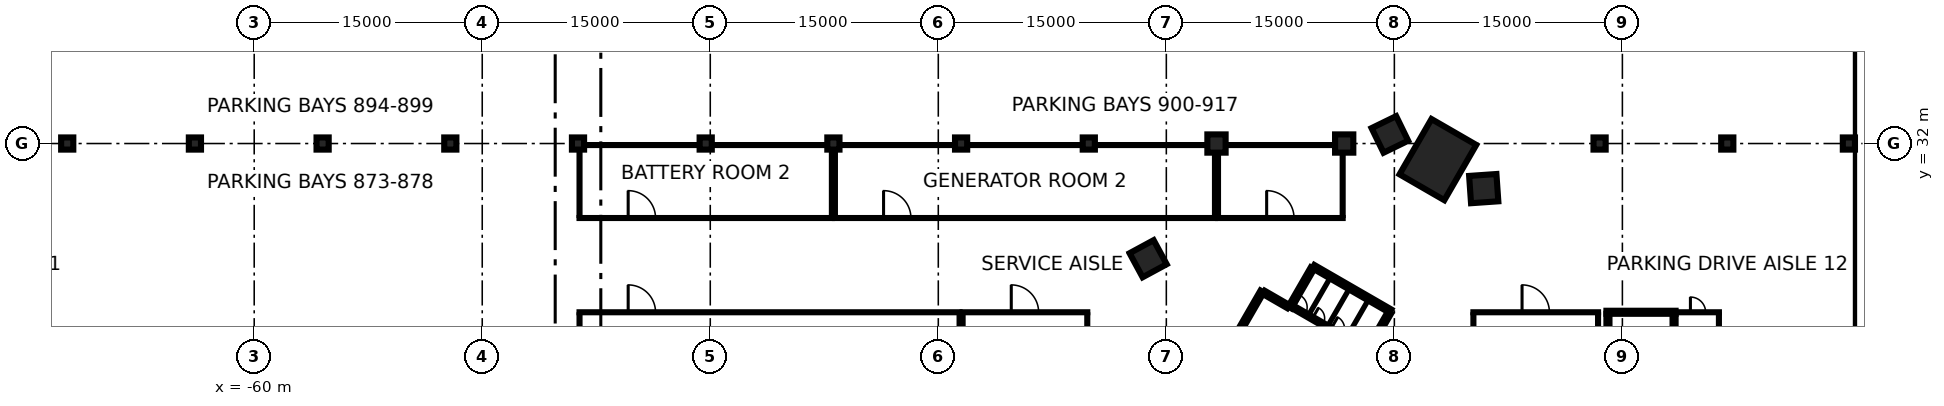
"""IFC4 building model, lengths in metres.
Left out: names, types, materials, properties, quantities, classifications, styles, units other than length and angle.
Written with IfcOpenShell. Run it as: python <this file> out.ifc"""

import sys

from ifc_helpers import new_model, si_unit, direction, frame, frame_2d, origin, origin_2d, place, context, subcontext, project, spatial, rectangle, extrude, element, fill, save


model = new_model("IFC4")
c1 = context("Model", 3, precision=1e-05, world=origin(), true_north=direction((0.0, 1.0)))
c2 = subcontext(c1, "Body", "Model", "MODEL_VIEW")
j1 = project(units=[si_unit("LENGTHUNIT", "METRE"), si_unit("PLANEANGLEUNIT", "RADIAN")], contexts=[c1])
p1 = place(None, origin())
s1 = spatial("IfcSite", under=j1, at=p1, CompositionType="ELEMENT")
p2 = place(p1, origin())
s2 = spatial("IfcBuilding", under=s1, at=p2, CompositionType="ELEMENT")
p3 = place(p2, frame((0.0, 0.0, -12.0)))
s3 = spatial("IfcBuildingStorey", under=s2, at=p3, CompositionType="ELEMENT", Elevation=-12.0)
p4 = place(p3, frame((45.75, -80.0, 0.0), z_axis=(0.0, 0.0, 1.0), x_axis=(0.0, 1.0, 0.0)))
e1 = element("IfcWall", 1, at=p4, inside=s3, PredefinedType="USERDEFINED", context=c2, shape_type="SweptSolid", body=[
    extrude(rectangle(XDim=160.0, YDim=0.9, at=frame_2d((80.0, 0.0))), origin(), (0.0, 0.0, 1.0), 11.55),
])
p5 = place(p2, frame((0.0, 0.0, -7.2)))
s4 = spatial("IfcBuildingStorey", under=s2, at=p5, CompositionType="ELEMENT", Elevation=-7.2)
p6 = place(p5, frame((17.865, 30.942, -0.4), z_axis=(0.0, 0.0, 1.0), x_axis=(0.5, 0.866025403784, 0.0)))
e2 = element("IfcColumn", 2, at=p6, inside=s4, PredefinedType="COLUMN", context=c2, shape_type="SweptSolid", body=[
    extrude(rectangle(XDim=4.2, YDim=3.4, at=origin_2d()), origin(), (0.0, 0.0, 1.0), 3.6),
])
for number, where, z_axis, x_axis in (
    (3, (20.879, 29.034, -0.4), (0.0, 0.0, 1.0), (0.998, 0.07, 0.0)),
    (4, (14.705, 32.599, -0.4), (0.0, 0.0, 1.0), (-0.438, 0.899, 0.0)),
    (5, (-1.197, 24.423, -0.4), (0.0, 0.0, 1.0), (-0.476, 0.879, 0.0)),
):
    element("IfcColumn", number, at=place(p5, frame(where, z_axis=z_axis, x_axis=x_axis)), inside=s4, PredefinedType="COLUMN", context=c2, shape_type="SweptSolid", body=[
        extrude(rectangle(XDim=1.8, YDim=1.8, at=origin_2d()), origin(), (0.0, 0.0, 1.0), 3.6),
    ])
for number, where, z_axis, x_axis in (
    (6, (-72.3, 32.0, -0.4), (0.0, 0.0, 1.0), (1.0, 0.0, 0.0)),
    (7, (-63.9, 32.0, -0.4), (0.0, 0.0, 1.0), (1.0, 0.0, 0.0)),
    (8, (-55.5, 32.0, -0.4), (0.0, 0.0, 1.0), (1.0, 0.0, 0.0)),
    (9, (-47.1, 32.0, -0.4), (0.0, 0.0, 1.0), (1.0, 0.0, 0.0)),
    (10, (-38.7, 32.0, -0.4), (0.0, 0.0, 1.0), (1.0, 0.0, 0.0)),
    (11, (-30.3, 32.0, -0.4), (0.0, 0.0, 1.0), (1.0, 0.0, 0.0)),
    (12, (-21.9, 32.0, -0.4), (0.0, 0.0, 1.0), (1.0, 0.0, 0.0)),
    (13, (-13.5, 32.0, -0.4), (0.0, 0.0, 1.0), (1.0, 0.0, 0.0)),
    (14, (-5.1, 32.0, -0.4), (0.0, 0.0, 1.0), (1.0, 0.0, 0.0)),
):
    element("IfcColumn", number, at=place(p5, frame(where, z_axis=z_axis, x_axis=x_axis)), inside=s4, PredefinedType="COLUMN", context=c2, shape_type="SweptSolid", body=[
        extrude(rectangle(XDim=0.8, YDim=0.8, at=origin_2d()), origin(), (0.0, 0.0, 1.0), 3.6),
    ])
for number, where, z_axis, x_axis in (
    (15, (3.3, 32.0, -0.4), (0.0, 0.0, 1.0), (1.0, 0.0, 0.0)),
    (16, (11.7, 32.0, -0.4), (0.0, 0.0, 1.0), (1.0, 0.0, 0.0)),
):
    element("IfcColumn", number, at=place(p5, frame(where, z_axis=z_axis, x_axis=x_axis)), inside=s4, PredefinedType="COLUMN", context=c2, shape_type="SweptSolid", body=[
        extrude(rectangle(XDim=1.2, YDim=1.2, at=origin_2d()), origin(), (0.0, 0.0, 1.0), 3.6),
    ])
for number, where, z_axis, x_axis in (
    (17, (28.5, 32.0, -0.4), (0.0, 0.0, 1.0), (1.0, 0.0, 0.0)),
    (18, (36.9, 32.0, -0.4), (0.0, 0.0, 1.0), (1.0, 0.0, 0.0)),
    (19, (44.9, 32.0, -0.4), (0.0, 0.0, 1.0), (1.0, 0.0, 0.0)),
):
    element("IfcColumn", number, at=place(p5, frame(where, z_axis=z_axis, x_axis=x_axis)), inside=s4, PredefinedType="COLUMN", context=c2, shape_type="SweptSolid", body=[
        extrude(rectangle(XDim=0.8, YDim=0.8, at=origin_2d()), origin(), (0.0, 0.0, 1.0), 3.6),
    ])
p7 = place(p5, frame((3.179, 16.856, 0.0), z_axis=(0.0, 0.0, 1.0), x_axis=(0.500004234368, 0.866022959057, 0.0)))
e20 = element("IfcWall", 20, at=p7, inside=s4, PredefinedType="SHEAR", context=c2, shape_type="SweptSolid", body=[
    extrude(rectangle(XDim=6.25, YDim=0.25, at=frame_2d((3.125, 0.0))), origin(), (0.0, 0.0, 1.0), 3.2),
])
p8 = place(p5, frame((9.673, 23.903, 0.0), z_axis=(0.0, 0.0, 1.0), x_axis=(0.86603616409, -0.499981362141, 0.0)))
e21 = element("IfcWall", 21, at=p8, inside=s4, PredefinedType="SHEAR", context=c2, shape_type="SweptSolid", body=[
    extrude(rectangle(XDim=5.85, YDim=0.25, at=frame_2d((2.925, 0.0))), origin(), (0.0, 0.0, 1.0), 3.2),
])
for number, where, z_axis, x_axis in (
    (22, (8.123, 21.219, 0.0), (0.0, 0.0, 1.0), (0.5, 0.866, 0.0)),
    (23, (14.676, 20.87, 0.0), (0.0, 0.0, 1.0), (-0.5, -0.866, 0.0)),
):
    element("IfcWall", number, at=place(p5, frame(where, z_axis=z_axis, x_axis=x_axis)), inside=s4, PredefinedType="SHEAR", context=c2, shape_type="SweptSolid", body=[
        extrude(rectangle(XDim=2.975, YDim=0.25, at=frame_2d((1.487, 0.0))), origin(), (0.0, 0.0, 1.0), 3.2),
    ])
p9 = place(p5, frame((6.413, 22.206, 0.0), z_axis=(0.0, 0.0, 1.0), x_axis=(0.866016279763, -0.500015802937, 0.0)))
e24 = element("IfcWall", 24, at=p9, inside=s4, PredefinedType="SHEAR", context=c2, shape_type="SweptSolid", body=[
    extrude(rectangle(XDim=1.849, YDim=0.25, at=frame_2d((0.925, 0.0))), origin(), (0.0, 0.0, 1.0), 3.2),
])
p10 = place(p5, frame((8.294, 21.264, 0.0), z_axis=(0.0, 0.0, 1.0), x_axis=(0.866025812541, -0.499999292012, 0.0)))
e25 = element("IfcWall", 25, at=p10, inside=s4, PredefinedType="SHEAR", context=c2, shape_type="SweptSolid", body=[
    extrude(rectangle(XDim=5.598, YDim=0.2, at=frame_2d((2.799, 0.0))), origin(), (0.0, 0.0, 1.0), 3.2),
])
p11 = place(p10, frame((4.524, 0.0, 0.0)))
e26 = element("IfcOpeningElement", 26, at=p11, cuts=e25, PredefinedType="OPENING", context=c2, shape_type="SweptSolid", body=[
    extrude(rectangle(XDim=0.9, YDim=2.1, at=frame_2d((0.45, 1.05))), frame((0.0, 0.11, 0.0), z_axis=(0.0, -1.0, 0.0), x_axis=(1.0, 0.0, 0.0)), (0.0, 0.0, 1.0), 0.22),
])
p12 = place(p10, frame((2.924, 0.0, 0.0)))
e27 = element("IfcOpeningElement", 27, at=p12, cuts=e25, PredefinedType="OPENING", context=c2, shape_type="SweptSolid", body=[
    extrude(rectangle(XDim=0.9, YDim=2.1, at=frame_2d((0.45, 1.05))), frame((0.0, 0.11, 0.0), z_axis=(0.0, -1.0, 0.0), x_axis=(1.0, 0.0, 0.0)), (0.0, 0.0, 1.0), 0.22),
])
p13 = place(p10, frame((1.524, 0.0, 0.0)))
e28 = element("IfcOpeningElement", 28, at=p13, cuts=e25, PredefinedType="OPENING", context=c2, shape_type="SweptSolid", body=[
    extrude(rectangle(XDim=0.8, YDim=2.1, at=frame_2d((0.4, 1.05))), frame((0.0, 0.11, 0.0), z_axis=(0.0, -1.0, 0.0), x_axis=(1.0, 0.0, 0.0)), (0.0, 0.0, 1.0), 0.22),
])
p14 = place(p10, frame((0.08, 0.0, 0.0)))
e29 = element("IfcOpeningElement", 29, at=p14, cuts=e25, PredefinedType="OPENING", context=c2, shape_type="SweptSolid", body=[
    extrude(rectangle(XDim=0.9, YDim=2.1, at=frame_2d((0.45, 1.05))), frame((0.0, 0.11, 0.0), z_axis=(0.0, -1.0, 0.0), x_axis=(1.0, 0.0, 0.0)), (0.0, 0.0, 1.0), 0.22),
])
for number, where, z_axis, x_axis in (
    (30, (10.639, 20.027, 0.0), (0.0, 0.0, 1.0), (0.5, 0.866, 0.0)),
    (31, (9.383, 20.752, 0.0), (0.0, 0.0, 1.0), (0.5, 0.866, 0.0)),
    (32, (11.894, 19.302, 0.0), (0.0, 0.0, 1.0), (0.5, 0.866, 0.0)),
):
    element("IfcWall", number, at=place(p5, frame(where, z_axis=z_axis, x_axis=x_axis)), inside=s4, PredefinedType="PARTITIONING", context=c2, shape_type="SweptSolid", body=[
        extrude(rectangle(XDim=2.749, YDim=0.15, at=frame_2d((1.374, 0.0))), origin(), (0.0, 0.0, 1.0), 3.2),
    ])
p15 = place(p5, frame((-38.7, 20.9, 0.0), z_axis=(0.0, 0.0, 1.0), x_axis=(1.0, 0.0, 0.0)))
e33 = element("IfcWall", 33, at=p15, inside=s4, PredefinedType="PARTITIONING", context=c2, shape_type="SweptSolid", body=[
    extrude(rectangle(XDim=25.2, YDim=0.2, at=frame_2d((12.6, 0.0))), origin(), (0.0, 0.0, 1.0), 3.2),
])
p16 = place(p15, frame((3.3, 0.0, 0.0)))
e34 = element("IfcOpeningElement", 34, at=p16, cuts=e33, PredefinedType="OPENING", context=c2, shape_type="SweptSolid", body=[
    extrude(rectangle(XDim=1.8, YDim=2.1, at=frame_2d((0.9, 1.05))), frame((0.0, 0.11, 0.0), z_axis=(0.0, -1.0, 0.0), x_axis=(1.0, 0.0, 0.0)), (0.0, 0.0, 1.0), 0.22),
])
for number, where, z_axis, x_axis in (
    (35, (-38.6, 16.6, 0.0), (0.0, 0.0, 1.0), (0.0, 1.0, 0.0)),
    (36, (-13.6, 16.6, 0.0), (0.0, 0.0, 1.0), (0.0, 1.0, 0.0)),
):
    element("IfcWall", number, at=place(p5, frame(where, z_axis=z_axis, x_axis=x_axis)), inside=s4, PredefinedType="PARTITIONING", context=c2, shape_type="SweptSolid", body=[
        extrude(rectangle(XDim=4.2, YDim=0.2, at=frame_2d((2.1, 0.0))), origin(), (0.0, 0.0, 1.0), 3.2),
    ])
p17 = place(p5, frame((-13.5, 20.9, 0.0), z_axis=(0.0, 0.0, 1.0), x_axis=(1.0, 0.0, 0.0)))
e37 = element("IfcWall", 37, at=p17, inside=s4, PredefinedType="PARTITIONING", context=c2, shape_type="SweptSolid", body=[
    extrude(rectangle(XDim=8.4, YDim=0.2, at=frame_2d((4.2, 0.0))), origin(), (0.0, 0.0, 1.0), 3.2),
])
p18 = place(p17, frame((3.3, 0.0, 0.0)))
e38 = element("IfcOpeningElement", 38, at=p18, cuts=e37, PredefinedType="OPENING", context=c2, shape_type="SweptSolid", body=[
    extrude(rectangle(XDim=1.8, YDim=2.1, at=frame_2d((0.9, 1.05))), frame((0.0, 0.11, 0.0), z_axis=(0.0, -1.0, 0.0), x_axis=(1.0, 0.0, 0.0)), (0.0, 0.0, 1.0), 0.22),
])
for number, where, z_axis, x_axis in (
    (39, (-13.4, 16.6, 0.0), (0.0, 0.0, 1.0), (0.0, 1.0, 0.0)),
    (40, (-5.2, 16.6, 0.0), (0.0, 0.0, 1.0), (0.0, 1.0, 0.0)),
):
    element("IfcWall", number, at=place(p5, frame(where, z_axis=z_axis, x_axis=x_axis)), inside=s4, PredefinedType="PARTITIONING", context=c2, shape_type="SweptSolid", body=[
        extrude(rectangle(XDim=4.2, YDim=0.2, at=frame_2d((2.1, 0.0))), origin(), (0.0, 0.0, 1.0), 3.2),
    ])
p19 = place(p5, frame((20.1, 20.9, 0.0), z_axis=(0.0, 0.0, 1.0), x_axis=(1.0, 0.0, 0.0)))
e41 = element("IfcWall", 41, at=p19, inside=s4, PredefinedType="PARTITIONING", context=c2, shape_type="SweptSolid", body=[
    extrude(rectangle(XDim=8.4, YDim=0.2, at=frame_2d((4.2, 0.0))), origin(), (0.0, 0.0, 1.0), 3.2),
])
p20 = place(p19, frame((3.3, 0.0, 0.0)))
e42 = element("IfcOpeningElement", 42, at=p20, cuts=e41, PredefinedType="OPENING", context=c2, shape_type="SweptSolid", body=[
    extrude(rectangle(XDim=1.8, YDim=2.1, at=frame_2d((0.9, 1.05))), frame((0.0, 0.11, 0.0), z_axis=(0.0, -1.0, 0.0), x_axis=(1.0, 0.0, 0.0)), (0.0, 0.0, 1.0), 0.22),
])
p21 = place(p5, frame((20.2, 16.6, 0.0), z_axis=(0.0, 0.0, 1.0), x_axis=(0.0, 1.0, 0.0)))
e43 = element("IfcWall", 43, at=p21, inside=s4, PredefinedType="PARTITIONING", context=c2, shape_type="SweptSolid", body=[
    extrude(rectangle(XDim=4.2, YDim=0.2, at=frame_2d((2.1, 0.0))), origin(), (0.0, 0.0, 1.0), 3.2),
])
p22 = place(p5, frame((28.4, 16.4, 0.0), z_axis=(0.0, 0.0, 1.0), x_axis=(0.0, 1.0, 0.0)))
e44 = element("IfcWall", 44, at=p22, inside=s4, PredefinedType="PARTITIONING", context=c2, shape_type="SweptSolid", body=[
    extrude(rectangle(XDim=4.4, YDim=0.2, at=frame_2d((2.2, 0.0))), origin(), (0.0, 0.0, 1.0), 3.2),
])
p23 = place(p5, frame((-38.7, 27.1, 0.0), z_axis=(0.0, 0.0, 1.0), x_axis=(1.0, 0.0, 0.0)))
e45 = element("IfcWall", 45, at=p23, inside=s4, PredefinedType="PARTITIONING", context=c2, shape_type="SweptSolid", body=[
    extrude(rectangle(XDim=16.8, YDim=0.2, at=frame_2d((8.4, 0.0))), origin(), (0.0, 0.0, 1.0), 3.2),
])
p24 = place(p23, frame((3.3, 0.0, 0.0)))
e46 = element("IfcOpeningElement", 46, at=p24, cuts=e45, PredefinedType="OPENING", context=c2, shape_type="SweptSolid", body=[
    extrude(rectangle(XDim=1.8, YDim=2.1, at=frame_2d((0.9, 1.05))), frame((0.0, 0.11, 0.0), z_axis=(0.0, -1.0, 0.0), x_axis=(1.0, 0.0, 0.0)), (0.0, 0.0, 1.0), 0.22),
])
p25 = place(p5, frame((-38.7, 31.9, 0.0), z_axis=(0.0, 0.0, 1.0), x_axis=(1.0, 0.0, 0.0)))
e47 = element("IfcWall", 47, at=p25, inside=s4, PredefinedType="PARTITIONING", context=c2, shape_type="SweptSolid", body=[
    extrude(rectangle(XDim=16.8, YDim=0.2, at=frame_2d((8.4, 0.0))), origin(), (0.0, 0.0, 1.0), 3.2),
])
for number, where, z_axis, x_axis in (
    (48, (-38.6, 27.2, 0.0), (0.0, 0.0, 1.0), (0.0, 1.0, 0.0)),
    (49, (-22.0, 27.2, 0.0), (0.0, 0.0, 1.0), (0.0, 1.0, 0.0)),
):
    element("IfcWall", number, at=place(p5, frame(where, z_axis=z_axis, x_axis=x_axis)), inside=s4, PredefinedType="PARTITIONING", context=c2, shape_type="SweptSolid", body=[
        extrude(rectangle(XDim=4.4, YDim=0.2, at=frame_2d((2.2, 0.0))), origin(), (0.0, 0.0, 1.0), 3.2),
    ])
p26 = place(p5, frame((-21.9, 27.1, 0.0), z_axis=(0.0, 0.0, 1.0), x_axis=(1.0, 0.0, 0.0)))
e50 = element("IfcWall", 50, at=p26, inside=s4, PredefinedType="PARTITIONING", context=c2, shape_type="SweptSolid", body=[
    extrude(rectangle(XDim=25.2, YDim=0.2, at=frame_2d((12.6, 0.0))), origin(), (0.0, 0.0, 1.0), 3.2),
])
p27 = place(p26, frame((3.3, 0.0, 0.0)))
e51 = element("IfcOpeningElement", 51, at=p27, cuts=e50, PredefinedType="OPENING", context=c2, shape_type="SweptSolid", body=[
    extrude(rectangle(XDim=1.8, YDim=2.1, at=frame_2d((0.9, 1.05))), frame((0.0, 0.11, 0.0), z_axis=(0.0, -1.0, 0.0), x_axis=(1.0, 0.0, 0.0)), (0.0, 0.0, 1.0), 0.22),
])
p28 = place(p5, frame((-21.9, 31.9, 0.0), z_axis=(0.0, 0.0, 1.0), x_axis=(1.0, 0.0, 0.0)))
e52 = element("IfcWall", 52, at=p28, inside=s4, PredefinedType="PARTITIONING", context=c2, shape_type="SweptSolid", body=[
    extrude(rectangle(XDim=25.2, YDim=0.2, at=frame_2d((12.6, 0.0))), origin(), (0.0, 0.0, 1.0), 3.2),
])
p29 = place(p5, frame((-21.8, 27.2, 0.0), z_axis=(0.0, 0.0, 1.0), x_axis=(0.0, 1.0, 0.0)))
e53 = element("IfcWall", 53, at=p29, inside=s4, PredefinedType="PARTITIONING", context=c2, shape_type="SweptSolid", body=[
    extrude(rectangle(XDim=4.4, YDim=0.2, at=frame_2d((2.2, 0.0))), origin(), (0.0, 0.0, 1.0), 3.2),
])
p30 = place(p5, frame((3.2, 27.2, 0.0), z_axis=(0.0, 0.0, 1.0), x_axis=(0.0, 1.0, 0.0)))
e54 = element("IfcWall", 54, at=p30, inside=s4, PredefinedType="PARTITIONING", context=c2, shape_type="SweptSolid", body=[
    extrude(rectangle(XDim=4.2, YDim=0.2, at=frame_2d((2.1, 0.0))), origin(), (0.0, 0.0, 1.0), 3.2),
])
p31 = place(p5, frame((3.3, 27.1, 0.0), z_axis=(0.0, 0.0, 1.0), x_axis=(1.0, 0.0, 0.0)))
e55 = element("IfcWall", 55, at=p31, inside=s4, PredefinedType="PARTITIONING", context=c2, shape_type="SweptSolid", body=[
    extrude(rectangle(XDim=8.4, YDim=0.2, at=frame_2d((4.2, 0.0))), origin(), (0.0, 0.0, 1.0), 3.2),
])
p32 = place(p31, frame((3.3, 0.0, 0.0)))
e56 = element("IfcOpeningElement", 56, at=p32, cuts=e55, PredefinedType="OPENING", context=c2, shape_type="SweptSolid", body=[
    extrude(rectangle(XDim=1.8, YDim=2.1, at=frame_2d((0.9, 1.05))), frame((0.0, 0.11, 0.0), z_axis=(0.0, -1.0, 0.0), x_axis=(1.0, 0.0, 0.0)), (0.0, 0.0, 1.0), 0.22),
])
p33 = place(p5, frame((3.3, 31.9, 0.0), z_axis=(0.0, 0.0, 1.0), x_axis=(1.0, 0.0, 0.0)))
e57 = element("IfcWall", 57, at=p33, inside=s4, PredefinedType="PARTITIONING", context=c2, shape_type="SweptSolid", body=[
    extrude(rectangle(XDim=8.4, YDim=0.2, at=frame_2d((4.2, 0.0))), origin(), (0.0, 0.0, 1.0), 3.2),
])
for number, where, z_axis, x_axis in (
    (58, (3.4, 27.2, 0.0), (0.0, 0.0, 1.0), (0.0, 1.0, 0.0)),
    (59, (11.6, 27.2, 0.0), (0.0, 0.0, 1.0), (0.0, 1.0, 0.0)),
):
    element("IfcWall", number, at=place(p5, frame(where, z_axis=z_axis, x_axis=x_axis)), inside=s4, PredefinedType="PARTITIONING", context=c2, shape_type="SweptSolid", body=[
        extrude(rectangle(XDim=4.2, YDim=0.2, at=frame_2d((2.1, 0.0))), origin(), (0.0, 0.0, 1.0), 3.2),
    ])
p34 = place(p5, frame((33.5, 20.9, 0.0), z_axis=(0.0, 0.0, 1.0), x_axis=(1.0, 0.0, 0.0)))
e60 = element("IfcWall", 60, at=p34, inside=s4, PredefinedType="PARTITIONING", context=c2, shape_type="SweptSolid", body=[
    extrude(rectangle(XDim=2.95, YDim=0.2, at=frame_2d((1.475, 0.0))), origin(), (0.0, 0.0, 1.0), 3.2),
])
p35 = place(p34, frame((0.975, 0.0, 0.0)))
e61 = element("IfcOpeningElement", 61, at=p35, cuts=e60, PredefinedType="OPENING", context=c2, shape_type="SweptSolid", body=[
    extrude(rectangle(XDim=1.0, YDim=2.1, at=frame_2d((0.5, 1.05))), frame((0.0, 0.11, 0.0), z_axis=(0.0, -1.0, 0.0), x_axis=(1.0, 0.0, 0.0)), (0.0, 0.0, 1.0), 0.22),
])
p36 = place(p5, frame((36.35, 15.2, 0.0), z_axis=(0.0, 0.0, 1.0), x_axis=(0.0, 1.0, 0.0)))
e62 = element("IfcWall", 62, at=p36, inside=s4, PredefinedType="PARTITIONING", context=c2, shape_type="SweptSolid", body=[
    extrude(rectangle(XDim=5.6, YDim=0.2, at=frame_2d((2.8, 0.0))), origin(), (0.0, 0.0, 1.0), 3.2),
])
p37 = place(p5, frame((29.05, 11.2, 0.0), z_axis=(0.0, 0.0, 1.0), x_axis=(0.0, 1.0, 0.0)))
e63 = element("IfcWall", 63, at=p37, inside=s4, PredefinedType="SOLIDWALL", context=c2, shape_type="SweptSolid", body=[
    extrude(rectangle(XDim=9.6, YDim=0.2, at=frame_2d((4.8, 0.0))), origin(), (0.0, 0.0, 1.0), 3.2),
])
p38 = place(p5, frame((33.4, 11.2, 0.0), z_axis=(0.0, 0.0, 1.0), x_axis=(0.0, 1.0, 0.0)))
e64 = element("IfcWall", 64, at=p38, inside=s4, PredefinedType="SOLIDWALL", context=c2, shape_type="SweptSolid", body=[
    extrude(rectangle(XDim=9.6, YDim=0.2, at=frame_2d((4.8, 0.0))), origin(), (0.0, 0.0, 1.0), 3.2),
])
p39 = place(p38, frame((0.4, 0.0, 0.0)))
e65 = element("IfcOpeningElement", 65, at=p39, cuts=e64, PredefinedType="OPENING", context=c2, shape_type="SweptSolid", body=[
    extrude(rectangle(XDim=1.2, YDim=2.1, at=frame_2d((0.6, 1.05))), frame((0.0, 0.11, 0.0), z_axis=(0.0, -1.0, 0.0), x_axis=(1.0, 0.0, 0.0)), (0.0, 0.0, 1.0), 0.22),
])
p40 = place(p5, frame((28.95, 20.9, 0.0), z_axis=(0.0, 0.0, 1.0), x_axis=(1.0, 0.0, 0.0)))
e66 = element("IfcWall", 66, at=p40, inside=s4, PredefinedType="SOLIDWALL", context=c2, shape_type="SweptSolid", body=[
    extrude(rectangle(XDim=4.55, YDim=0.2, at=frame_2d((2.275, 0.0))), origin(), (0.0, 0.0, 1.0), 3.2),
])
p41 = place(p13, origin())
e67 = element("IfcDoor", 67, at=p41, inside=s4, OperationType="SINGLE_SWING_LEFT", PredefinedType="DOOR", context=c2, shape_type="SweptSolid", body=[
    extrude(rectangle(XDim=0.8, YDim=2.1, at=frame_2d((0.4, 1.05))), frame((0.0, 0.025, 0.0), z_axis=(0.0, -1.0, 0.0), x_axis=(1.0, 0.0, 0.0)), (0.0, 0.0, 1.0), 0.05),
])
fill(e28, e67)
p42 = place(p14, origin())
e68 = element("IfcDoor", 68, at=p42, inside=s4, OperationType="SINGLE_SWING_RIGHT", PredefinedType="DOOR", context=c2, shape_type="SweptSolid", body=[
    extrude(rectangle(XDim=0.9, YDim=2.1, at=frame_2d((0.45, 1.05))), frame((0.0, 0.025, 0.0), z_axis=(0.0, -1.0, 0.0), x_axis=(1.0, 0.0, 0.0)), (0.0, 0.0, 1.0), 0.05),
])
fill(e29, e68)
p43 = place(p16, origin())
e69 = element("IfcDoor", 69, at=p43, inside=s4, OperationType="DOUBLE_DOOR_SINGLE_SWING", PredefinedType="DOOR", context=c2, shape_type="SweptSolid", body=[
    extrude(rectangle(XDim=1.8, YDim=2.1, at=frame_2d((0.9, 1.05))), frame((0.0, 0.025, 0.0), z_axis=(0.0, -1.0, 0.0), x_axis=(1.0, 0.0, 0.0)), (0.0, 0.0, 1.0), 0.05),
])
fill(e34, e69)
p44 = place(p18, origin())
e70 = element("IfcDoor", 70, at=p44, inside=s4, OperationType="DOUBLE_DOOR_SINGLE_SWING", PredefinedType="DOOR", context=c2, shape_type="SweptSolid", body=[
    extrude(rectangle(XDim=1.8, YDim=2.1, at=frame_2d((0.9, 1.05))), frame((0.0, 0.025, 0.0), z_axis=(0.0, -1.0, 0.0), x_axis=(1.0, 0.0, 0.0)), (0.0, 0.0, 1.0), 0.05),
])
fill(e38, e70)
p45 = place(p20, origin())
e71 = element("IfcDoor", 71, at=p45, inside=s4, OperationType="DOUBLE_DOOR_SINGLE_SWING", PredefinedType="DOOR", context=c2, shape_type="SweptSolid", body=[
    extrude(rectangle(XDim=1.8, YDim=2.1, at=frame_2d((0.9, 1.05))), frame((0.0, 0.025, 0.0), z_axis=(0.0, -1.0, 0.0), x_axis=(1.0, 0.0, 0.0)), (0.0, 0.0, 1.0), 0.05),
])
fill(e42, e71)
p46 = place(p24, origin())
e72 = element("IfcDoor", 72, at=p46, inside=s4, OperationType="DOUBLE_DOOR_SINGLE_SWING", PredefinedType="DOOR", context=c2, shape_type="SweptSolid", body=[
    extrude(rectangle(XDim=1.8, YDim=2.1, at=frame_2d((0.9, 1.05))), frame((0.0, 0.025, 0.0), z_axis=(0.0, -1.0, 0.0), x_axis=(1.0, 0.0, 0.0)), (0.0, 0.0, 1.0), 0.05),
])
fill(e46, e72)
p47 = place(p27, origin())
e73 = element("IfcDoor", 73, at=p47, inside=s4, OperationType="DOUBLE_DOOR_SINGLE_SWING", PredefinedType="DOOR", context=c2, shape_type="SweptSolid", body=[
    extrude(rectangle(XDim=1.8, YDim=2.1, at=frame_2d((0.9, 1.05))), frame((0.0, 0.025, 0.0), z_axis=(0.0, -1.0, 0.0), x_axis=(1.0, 0.0, 0.0)), (0.0, 0.0, 1.0), 0.05),
])
fill(e51, e73)
p48 = place(p32, origin())
e74 = element("IfcDoor", 74, at=p48, inside=s4, OperationType="DOUBLE_DOOR_SINGLE_SWING", PredefinedType="DOOR", context=c2, shape_type="SweptSolid", body=[
    extrude(rectangle(XDim=1.8, YDim=2.1, at=frame_2d((0.9, 1.05))), frame((0.0, 0.025, 0.0), z_axis=(0.0, -1.0, 0.0), x_axis=(1.0, 0.0, 0.0)), (0.0, 0.0, 1.0), 0.05),
])
fill(e56, e74)
p49 = place(p35, origin())
e75 = element("IfcDoor", 75, at=p49, inside=s4, OperationType="SINGLE_SWING_LEFT", PredefinedType="DOOR", context=c2, shape_type="SweptSolid", body=[
    extrude(rectangle(XDim=1.0, YDim=2.1, at=frame_2d((0.5, 1.05))), frame((0.0, 0.025, 0.0), z_axis=(0.0, -1.0, 0.0), x_axis=(1.0, 0.0, 0.0)), (0.0, 0.0, 1.0), 0.05),
])
fill(e61, e75)
save(model, sys.argv[1])
